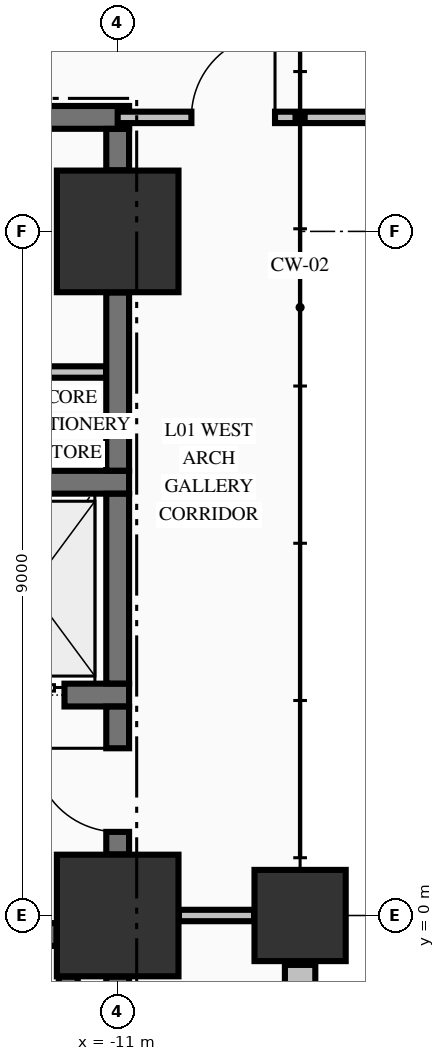
"""IFC4 building model, lengths in metres.
Left out: names, types, materials, properties, quantities, classifications, styles, units other than length and angle.
Written with IfcOpenShell. Run it as: python <this file> out.ifc"""

import sys

from ifc_helpers import new_model, si_unit, direction, frame, frame_2d, origin, origin_2d, place, context, subcontext, project, spatial, rectangle, extrude, element, fill, save


model = new_model("IFC4")
c1 = context("Model", 3, precision=1e-05, world=origin(), true_north=direction((0.0, 1.0)))
c2 = subcontext(c1, "Body", "Model", "MODEL_VIEW")
j1 = project(units=[si_unit("LENGTHUNIT", "METRE"), si_unit("PLANEANGLEUNIT", "RADIAN")], contexts=[c1])
p1 = place(None, origin())
s1 = spatial("IfcSite", under=j1, at=p1, CompositionType="ELEMENT")
p2 = place(p1, origin())
s2 = spatial("IfcBuilding", under=s1, at=p2, CompositionType="ELEMENT")
p3 = place(p2, frame((0.0, 0.0, 5.44)))
s3 = spatial("IfcBuildingStorey", under=s2, at=p3, CompositionType="ELEMENT", Elevation=5.44)
for number, where, z_axis, x_axis in (
    (1, (-11.0, 0.0, 0.0), (0.0, 0.0, 1.0), (1.0, 0.0, 0.0)),
    (2, (-11.0, 9.0, 0.0), (0.0, 0.0, 1.0), (1.0, 0.0, 0.0)),
):
    element("IfcColumn", number, at=place(p3, frame(where, z_axis=z_axis, x_axis=x_axis)), inside=s3, PredefinedType="COLUMN", context=c2, shape_type="SweptSolid", body=[
        extrude(rectangle(XDim=1.6, YDim=1.6, at=origin_2d()), origin(), (0.0, 0.0, 1.0), 5.09),
    ])
p4 = place(p3, frame((-8.6, 0.0, 0.0), z_axis=(0.0, 0.0, 1.0), x_axis=(1.0, 0.0, 0.0)))
e3 = element("IfcColumn", 3, at=p4, inside=s3, PredefinedType="COLUMN", context=c2, shape_type="SweptSolid", body=[
    extrude(rectangle(XDim=1.2, YDim=1.2, at=origin_2d()), origin(), (0.0, 0.0, 1.0), 5.09),
])
p5 = place(p3, frame((-8.6, -25.37, 0.0), z_axis=(0.0, 0.0, 1.0), x_axis=(0.0, 1.0, 0.0)))
e4 = element("IfcWall", 4, at=p5, inside=s3, PredefinedType="STANDARD", context=c2, shape_type="SweptSolid", body=[
    extrude(rectangle(XDim=24.72, YDim=0.4, at=frame_2d((12.36, 0.0))), origin(), (0.0, 0.0, 1.0), 4.132),
])
p6 = place(p3, frame((-19.196, -0.25, 0.0), z_axis=(0.0, 0.0, 1.0), x_axis=(1.0, 0.0, 0.0)))
e5 = element("IfcWall", 5, at=p6, inside=s3, PredefinedType="SHEAR", context=c2, shape_type="SweptSolid", body=[
    extrude(rectangle(XDim=7.392, YDim=0.3, at=frame_2d((3.696, 0.0))), origin(), (0.0, 0.0, 1.0), 5.09),
])
p7 = place(p6, frame((5.496, 0.0, 0.0)))
e6 = element("IfcOpeningElement", 6, at=p7, cuts=e5, PredefinedType="OPENING", context=c2, shape_type="SweptSolid", body=[
    extrude(rectangle(XDim=1.1, YDim=2.15, at=frame_2d((0.55, 1.075))), frame((0.0, 0.16, 0.0), z_axis=(0.0, -1.0, 0.0), x_axis=(1.0, 0.0, 0.0)), (0.0, 0.0, 1.0), 0.32),
])
p8 = place(p3, frame((-14.875, 2.9, 0.0), z_axis=(0.0, 0.0, 1.0), x_axis=(1.0, 0.0, 0.0)))
e7 = element("IfcWall", 7, at=p8, inside=s3, PredefinedType="SHEAR", context=c2, shape_type="SweptSolid", body=[
    extrude(rectangle(XDim=4.025, YDim=0.3, at=frame_2d((2.012, 0.0))), origin(), (0.0, 0.0, 1.0), 5.09),
])
p9 = place(p8, frame((2.075, 0.0, 0.0)))
e8 = element("IfcOpeningElement", 8, at=p9, cuts=e7, PredefinedType="OPENING", context=c2, shape_type="SweptSolid", body=[
    extrude(rectangle(XDim=1.1, YDim=2.2, at=frame_2d((0.55, 1.1))), frame((0.0, 0.16, 0.0), z_axis=(0.0, -1.0, 0.0), x_axis=(1.0, 0.0, 0.0)), (0.0, 0.0, 1.0), 0.32),
])
p10 = place(p3, frame((-14.875, 5.7, 0.0), z_axis=(0.0, 0.0, 1.0), x_axis=(1.0, 0.0, 0.0)))
e9 = element("IfcWall", 9, at=p10, inside=s3, PredefinedType="SHEAR", context=c2, shape_type="SweptSolid", body=[
    extrude(rectangle(XDim=4.025, YDim=0.3, at=frame_2d((2.012, 0.0))), origin(), (0.0, 0.0, 1.0), 5.09),
])
p11 = place(p3, frame((-14.7, 10.5, 0.0), z_axis=(0.0, 0.0, 1.0), x_axis=(1.0, 0.0, 0.0)))
e10 = element("IfcWall", 10, at=p11, inside=s3, PredefinedType="SHEAR", context=c2, shape_type="SweptSolid", body=[
    extrude(rectangle(XDim=3.85, YDim=0.3, at=frame_2d((1.925, 0.0))), origin(), (0.0, 0.0, 1.0), 5.09),
])
p12 = place(p11, frame((0.305, 0.0, 0.0)))
e11 = element("IfcOpeningElement", 11, at=p12, cuts=e10, PredefinedType="OPENING", context=c2, shape_type="SweptSolid", body=[
    extrude(rectangle(XDim=0.95, YDim=2.15, at=frame_2d((0.475, 1.075))), frame((0.0, 0.16, 0.0), z_axis=(0.0, -1.0, 0.0), x_axis=(1.0, 0.0, 0.0)), (0.0, 0.0, 1.0), 0.32),
])
p13 = place(p3, frame((-10.194, 0.0, 0.0), z_axis=(0.0, 0.0, 1.0), x_axis=(1.0, 0.0, 0.0)))
e12 = element("IfcWall", 12, at=p13, inside=s3, PredefinedType="PARTITIONING", context=c2, shape_type="SweptSolid", body=[
    extrude(rectangle(XDim=0.988, YDim=0.15, at=frame_2d((0.494, 0.0))), origin(), (0.0, 0.0, 1.0), 4.132),
])
p14 = place(p3, frame((-13.225, 7.15, 0.0), z_axis=(0.0, 0.0, 1.0), x_axis=(1.0, 0.0, 0.0)))
e13 = element("IfcWall", 13, at=p14, inside=s3, PredefinedType="PARTITIONING", context=c2, shape_type="SweptSolid", body=[
    extrude(rectangle(XDim=2.072, YDim=0.15, at=frame_2d((1.036, 0.0))), origin(), (0.0, 0.0, 1.0), 5.09),
])
p15 = place(p3, frame((-11.0, 10.5, 0.0), z_axis=(0.0, 0.0, 1.0), x_axis=(1.0, 0.0, 0.0)))
e14 = element("IfcWall", 14, at=p15, inside=s3, PredefinedType="PARTITIONING", context=c2, shape_type="SweptSolid", body=[
    extrude(rectangle(XDim=2.34, YDim=0.15, at=frame_2d((1.17, 0.0))), origin(), (0.0, 0.0, 1.0), 5.09),
])
p16 = place(p15, frame((0.97, 0.0, 0.0)))
e15 = element("IfcOpeningElement", 15, at=p16, cuts=e14, PredefinedType="OPENING", context=c2, shape_type="SweptSolid", body=[
    extrude(rectangle(XDim=1.1, YDim=2.15, at=frame_2d((0.55, 1.075))), frame((0.0, 0.085, 0.0), z_axis=(0.0, -1.0, 0.0), x_axis=(1.0, 0.0, 0.0)), (0.0, 0.0, 1.0), 0.17),
])
p17 = place(p3, frame((-8.54, 10.5, 0.0), z_axis=(0.0, 0.0, 1.0), x_axis=(1.0, 0.0, 0.0)))
e16 = element("IfcWall", 16, at=p17, inside=s3, PredefinedType="PARTITIONING", context=c2, shape_type="SweptSolid", body=[
    extrude(rectangle(XDim=17.08, YDim=0.15, at=frame_2d((8.54, 0.0))), origin(), (0.0, 0.0, 1.0), 5.09),
])
p18 = place(p3, frame((-11.65, -8.196, 0.0), z_axis=(0.0, 0.0, 1.0), x_axis=(0.0, 1.0, 0.0)))
e17 = element("IfcWall", 17, at=p18, inside=s3, PredefinedType="SOLIDWALL", context=c2, shape_type="SweptSolid", body=[
    extrude(rectangle(XDim=7.392, YDim=0.25, at=frame_2d((3.696, 0.0))), origin(), (0.0, 0.0, 1.0), 5.09),
])
p19 = place(p3, frame((-11.0, -8.196, 0.0), z_axis=(0.0, 0.0, 1.0), x_axis=(0.0, 1.0, 0.0)))
e18 = element("IfcWall", 18, at=p19, inside=s3, PredefinedType="SHEAR", context=c2, shape_type="SweptSolid", body=[
    extrude(rectangle(XDim=7.392, YDim=0.3, at=frame_2d((3.696, 0.0))), origin(), (0.0, 0.0, 1.0), 5.09),
])
p20 = place(p3, frame((-11.0, 0.804, 0.0), z_axis=(0.0, 0.0, 1.0), x_axis=(0.0, 1.0, 0.0)))
e19 = element("IfcWall", 19, at=p20, inside=s3, PredefinedType="SHEAR", context=c2, shape_type="SweptSolid", body=[
    extrude(rectangle(XDim=1.944, YDim=0.3, at=frame_2d((0.972, 0.0))), origin(), (0.0, 0.0, 1.0), 5.09),
])
p21 = place(p20, frame((0.296, 0.0, 0.0)))
e20 = element("IfcOpeningElement", 20, at=p21, cuts=e19, PredefinedType="OPENING", context=c2, shape_type="SweptSolid", body=[
    extrude(rectangle(XDim=1.1, YDim=2.15, at=frame_2d((0.55, 1.075))), frame((0.0, 0.16, 0.0), z_axis=(0.0, -1.0, 0.0), x_axis=(1.0, 0.0, 0.0)), (0.0, 0.0, 1.0), 0.32),
])
p22 = place(p3, frame((-11.0, 3.052, 0.0), z_axis=(0.0, 0.0, 1.0), x_axis=(0.0, 1.0, 0.0)))
e21 = element("IfcWall", 21, at=p22, inside=s3, PredefinedType="SHEAR", context=c2, shape_type="SweptSolid", body=[
    extrude(rectangle(XDim=2.496, YDim=0.3, at=frame_2d((1.248, 0.0))), origin(), (0.0, 0.0, 1.0), 5.09),
])
p23 = place(p3, frame((-11.0, 5.852, 0.0), z_axis=(0.0, 0.0, 1.0), x_axis=(0.0, 1.0, 0.0)))
e22 = element("IfcWall", 22, at=p23, inside=s3, PredefinedType="SHEAR", context=c2, shape_type="SweptSolid", body=[
    extrude(rectangle(XDim=2.344, YDim=0.3, at=frame_2d((1.172, 0.0))), origin(), (0.0, 0.0, 1.0), 5.09),
])
p24 = place(p3, frame((-11.0, 9.804, 0.0), z_axis=(0.0, 0.0, 1.0), x_axis=(0.0, 1.0, 0.0)))
e23 = element("IfcWall", 23, at=p24, inside=s3, PredefinedType="SHEAR", context=c2, shape_type="SweptSolid", body=[
    extrude(rectangle(XDim=0.544, YDim=0.3, at=frame_2d((0.272, 0.0))), origin(), (0.0, 0.0, 1.0), 5.09),
])
p25 = place(p21, origin())
e24 = element("IfcDoor", 24, at=p25, inside=s3, OperationType="SINGLE_SWING_RIGHT", PredefinedType="DOOR", context=c2, shape_type="SweptSolid", body=[
    extrude(rectangle(XDim=1.1, YDim=2.15, at=frame_2d((0.55, 1.075))), frame((0.0, 0.025, 0.0), z_axis=(0.0, -1.0, 0.0), x_axis=(1.0, 0.0, 0.0)), (0.0, 0.0, 1.0), 0.05),
])
fill(e20, e24)
p26 = place(p9, origin())
e25 = element("IfcDoor", 25, at=p26, inside=s3, OperationType="SLIDING_TO_LEFT", PredefinedType="DOOR", context=c2, shape_type="SweptSolid", body=[
    extrude(rectangle(XDim=1.1, YDim=2.2, at=frame_2d((0.55, 1.1))), frame((0.0, 0.025, 0.0), z_axis=(0.0, -1.0, 0.0), x_axis=(1.0, 0.0, 0.0)), (0.0, 0.0, 1.0), 0.05),
])
fill(e8, e25)
p27 = place(p16, origin())
e26 = element("IfcDoor", 26, at=p27, inside=s3, OperationType="SINGLE_SWING_RIGHT", PredefinedType="DOOR", context=c2, shape_type="SweptSolid", body=[
    extrude(rectangle(XDim=1.1, YDim=2.15, at=frame_2d((0.55, 1.075))), frame((0.0, 0.025, 0.0), z_axis=(0.0, -1.0, 0.0), x_axis=(1.0, 0.0, 0.0)), (0.0, 0.0, 1.0), 0.05),
])
fill(e15, e26)
save(model, sys.argv[1])
